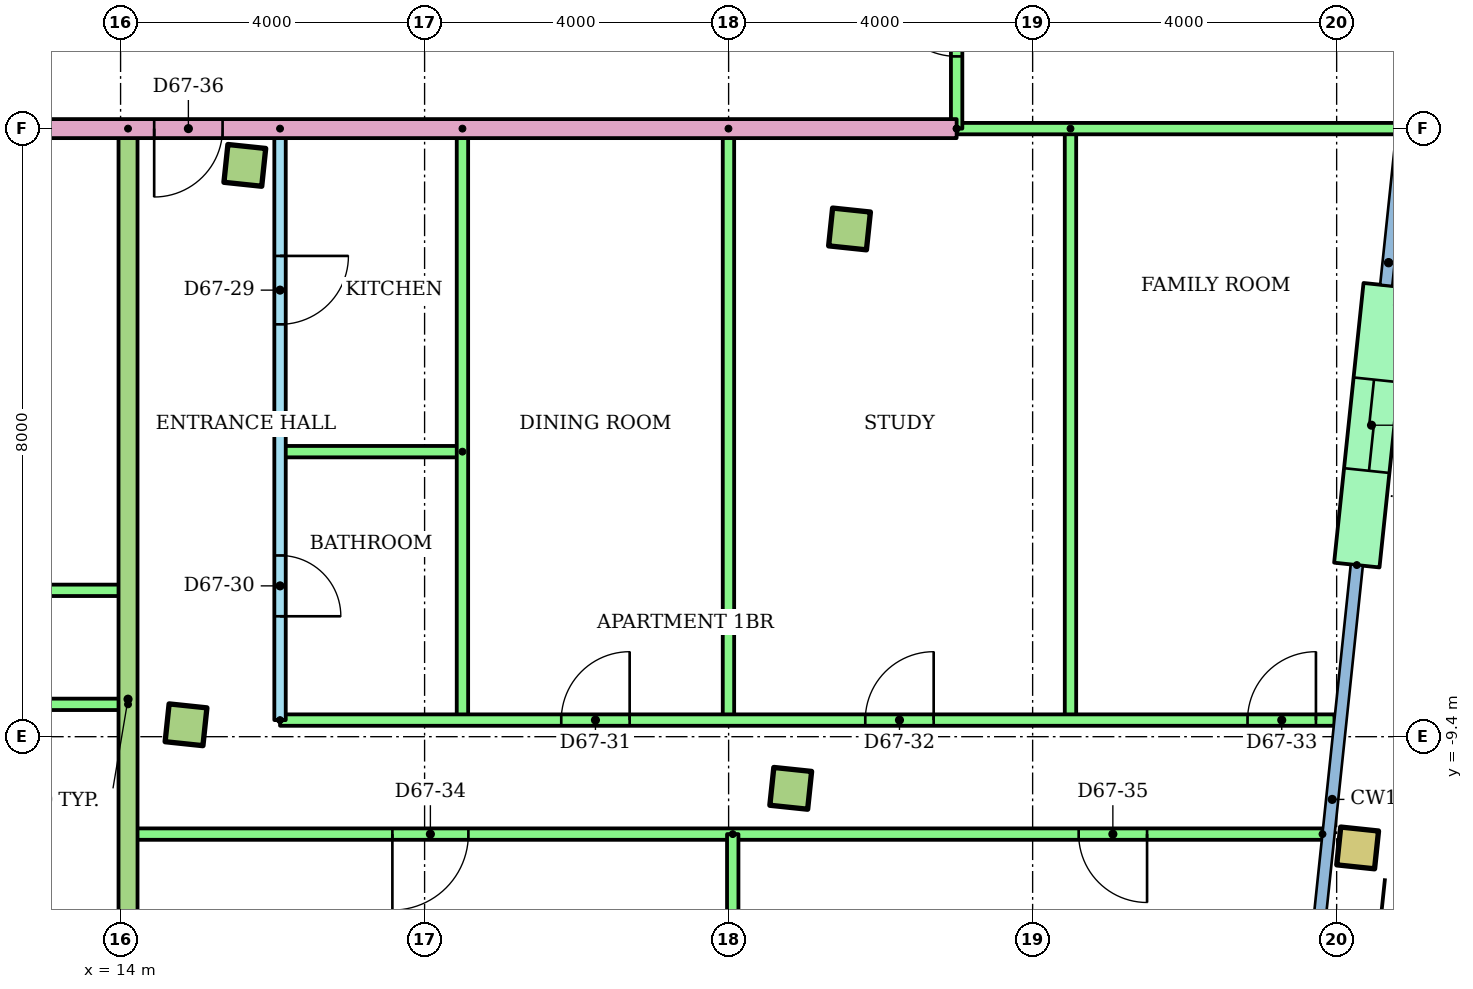
"""IFC4 building model, lengths in metres.
Left out: names, types, materials, properties, quantities, classifications, styles, units other than length and angle.
Written with IfcOpenShell. Run it as: python <this file> out.ifc"""

import sys

from ifc_helpers import new_model, si_unit, direction, frame, frame_2d, origin, origin_2d, place, context, subcontext, project, spatial, rectangle, hollow_rectangle, extrude, element, fill, save


model = new_model("IFC4")
c1 = context("Model", 3, precision=1e-05, world=origin(), true_north=direction((0.0, 1.0)))
c2 = subcontext(c1, "Body", "Model", "MODEL_VIEW")
j1 = project(units=[si_unit("LENGTHUNIT", "METRE"), si_unit("PLANEANGLEUNIT", "RADIAN")], contexts=[c1])
p1 = place(None, origin())
s1 = spatial("IfcSite", under=j1, at=p1, CompositionType="ELEMENT")
p2 = place(p1, origin())
s2 = spatial("IfcBuilding", under=s1, at=p2, CompositionType="ELEMENT")
p3 = place(p2, frame((0.0, 0.0, 259.5)))
s3 = spatial("IfcBuildingStorey", under=s2, at=p3, CompositionType="ELEMENT", Elevation=259.5)
for number, where, z_axis, x_axis in (
    (1, (14.861, -9.243, 0.0), (0.0, 0.0, 1.0), (0.995, -0.105, 0.0)),
    (2, (22.817, -10.08, 0.0), (0.0, 0.0, 1.0), (0.995, -0.105, 0.0)),
):
    element("IfcColumn", number, at=place(p3, frame(where, z_axis=z_axis, x_axis=x_axis)), inside=s3, PredefinedType="COLUMN", context=c2, shape_type="SweptSolid", body=[
        extrude(rectangle(XDim=0.5, YDim=0.5, at=origin_2d()), origin(), (0.0, 0.0, 1.0), 3.2),
    ])
p4 = place(p3, frame((30.276, -10.864, 0.0), z_axis=(0.0, 0.0, 1.0), x_axis=(0.994521895368, -0.104528463268, 0.0)))
e3 = element("IfcColumn", 3, at=p4, inside=s3, PredefinedType="COLUMN", context=c2, shape_type="SweptSolid", body=[
    extrude(hollow_rectangle(XDim=0.5, YDim=0.5, WallThickness=0.025, at=origin_2d()), origin(), (0.0, 0.0, 1.0), 3.2),
])
for number, where, z_axis, x_axis in (
    (4, (15.635, -1.884, 0.0), (0.0, 0.0, 1.0), (0.995, -0.105, 0.0)),
    (5, (23.591, -2.72, 0.0), (0.0, 0.0, 1.0), (0.995, -0.105, 0.0)),
):
    element("IfcColumn", number, at=place(p3, frame(where, z_axis=z_axis, x_axis=x_axis)), inside=s3, PredefinedType="COLUMN", context=c2, shape_type="SweptSolid", body=[
        extrude(rectangle(XDim=0.5, YDim=0.5, at=origin_2d()), origin(), (0.0, 0.0, 1.0), 3.2),
    ])
p5 = place(p3, frame((30.265, -7.142, 0.0), z_axis=(0.0, 0.0, 1.0), x_axis=(0.104513052986, 0.994523514933, 0.0)))
e6 = element("IfcWall", 6, at=p5, inside=s3, PredefinedType="STANDARD", context=c2, shape_type="SweptSolid", body=[
    extrude(rectangle(XDim=3.7, YDim=0.6, at=frame_2d((1.85, 0.0))), origin(), (0.0, 0.0, 1.0), 2.92),
])
p6 = place(p5, frame((1.25, 0.0, 0.0)))
e7 = element("IfcOpeningElement", 7, at=p6, cuts=e6, PredefinedType="OPENING", context=c2, shape_type="SweptSolid", body=[
    extrude(rectangle(XDim=1.2, YDim=2.1, at=frame_2d((0.6, 1.05))), frame((0.0, 0.31, 0.0), z_axis=(0.0, -1.0, 0.0), x_axis=(1.0, 0.0, 0.0)), (0.0, 0.0, 1.0), 0.62),
])
p7 = place(p3, frame((-7.77, -7.475, 0.0)))
e8 = element("IfcWall", 8, at=p7, inside=s3, PredefinedType="PARTITIONING", context=c2, shape_type="SweptSolid", body=[
    extrude(rectangle(XDim=21.868, YDim=0.15, at=frame_2d((10.934, 0.0))), origin(), (0.0, 0.0, 1.0), 2.4),
])
p8 = place(p7, frame((5.414, 0.0, 0.0)))
e9 = element("IfcOpeningElement", 9, at=p8, cuts=e8, PredefinedType="OPENING", context=c2, shape_type="SweptSolid", body=[
    extrude(rectangle(XDim=0.9, YDim=2.1, at=frame_2d((0.45, 1.05))), frame((0.0, 0.085, 0.0), z_axis=(0.0, -1.0, 0.0), x_axis=(1.0, 0.0, 0.0)), (0.0, 0.0, 1.0), 0.17),
])
p9 = place(p7, frame((13.37, 0.0, 0.0)))
e10 = element("IfcOpeningElement", 10, at=p9, cuts=e8, PredefinedType="OPENING", context=c2, shape_type="SweptSolid", body=[
    extrude(rectangle(XDim=0.9, YDim=2.1, at=frame_2d((0.45, 1.05))), frame((0.0, 0.085, 0.0), z_axis=(0.0, -1.0, 0.0), x_axis=(1.0, 0.0, 0.0)), (0.0, 0.0, 1.0), 0.17),
])
p10 = place(p7, frame((19.059, 0.0, 0.0)))
e11 = element("IfcOpeningElement", 11, at=p10, cuts=e8, PredefinedType="OPENING", context=c2, shape_type="SweptSolid", body=[
    extrude(rectangle(XDim=0.9, YDim=2.1, at=frame_2d((0.45, 1.05))), frame((0.0, 0.085, 0.0), z_axis=(0.0, -1.0, 0.0), x_axis=(1.0, 0.0, 0.0)), (0.0, 0.0, 1.0), 0.17),
])
p11 = place(p3, frame((14.098, -8.975, 0.0), z_axis=(0.0, 0.0, 1.0), x_axis=(-1.0, 0.0, 0.0)))
e12 = element("IfcWall", 12, at=p11, inside=s3, PredefinedType="PARTITIONING", context=c2, shape_type="SweptSolid", body=[
    extrude(rectangle(XDim=23.868, YDim=0.15, at=frame_2d((11.934, 0.0))), origin(), (0.0, 0.0, 1.0), 2.4),
])
p12 = place(p11, frame((21.429, 0.0, 0.0)))
e13 = element("IfcOpeningElement", 13, at=p12, cuts=e12, PredefinedType="OPENING", context=c2, shape_type="SweptSolid", body=[
    extrude(rectangle(XDim=0.9, YDim=2.1, at=frame_2d((0.45, 1.05))), frame((0.0, 0.085, 0.0), z_axis=(0.0, -1.0, 0.0), x_axis=(1.0, 0.0, 0.0)), (0.0, 0.0, 1.0), 0.17),
])
p13 = place(p11, frame((17.451, 0.0, 0.0)))
e14 = element("IfcOpeningElement", 14, at=p13, cuts=e12, PredefinedType="OPENING", context=c2, shape_type="SweptSolid", body=[
    extrude(rectangle(XDim=0.9, YDim=2.1, at=frame_2d((0.45, 1.05))), frame((0.0, 0.085, 0.0), z_axis=(0.0, -1.0, 0.0), x_axis=(1.0, 0.0, 0.0)), (0.0, 0.0, 1.0), 0.17),
])
p14 = place(p11, frame((12.252, 0.0, 0.0)))
e15 = element("IfcOpeningElement", 15, at=p14, cuts=e12, PredefinedType="OPENING", context=c2, shape_type="SweptSolid", body=[
    extrude(rectangle(XDim=0.9, YDim=2.1, at=frame_2d((0.45, 1.05))), frame((0.0, 0.085, 0.0), z_axis=(0.0, -1.0, 0.0), x_axis=(1.0, 0.0, 0.0)), (0.0, 0.0, 1.0), 0.17),
])
p15 = place(p11, frame((9.495, 0.0, 0.0)))
e16 = element("IfcOpeningElement", 16, at=p15, cuts=e12, PredefinedType="OPENING", context=c2, shape_type="SweptSolid", body=[
    extrude(rectangle(XDim=0.9, YDim=2.1, at=frame_2d((0.45, 1.05))), frame((0.0, 0.085, 0.0), z_axis=(0.0, -1.0, 0.0), x_axis=(1.0, 0.0, 0.0)), (0.0, 0.0, 1.0), 0.17),
])
p16 = place(p11, frame((3.478, 0.0, 0.0)))
e17 = element("IfcOpeningElement", 17, at=p16, cuts=e12, PredefinedType="OPENING", context=c2, shape_type="SweptSolid", body=[
    extrude(rectangle(XDim=1.0, YDim=2.1, at=frame_2d((0.5, 1.05))), frame((0.0, 0.085, 0.0), z_axis=(0.0, -1.0, 0.0), x_axis=(1.0, 0.0, 0.0)), (0.0, 0.0, 1.0), 0.17),
])
p17 = place(p3, frame((16.098, -1.4, 0.0), z_axis=(0.0, 0.0, 1.0), x_axis=(0.0, -1.0, 0.0)))
e18 = element("IfcWall", 18, at=p17, inside=s3, PredefinedType="PARTITIONING", context=c2, shape_type="SweptSolid", body=[
    extrude(rectangle(XDim=7.782, YDim=0.15, at=frame_2d((3.891, 0.0))), origin(), (0.0, 0.0, 1.0), 2.4),
])
p18 = place(p17, frame((1.675, 0.0, 0.0)))
e19 = element("IfcOpeningElement", 19, at=p18, cuts=e18, PredefinedType="OPENING", context=c2, shape_type="SweptSolid", body=[
    extrude(rectangle(XDim=0.9, YDim=2.1, at=frame_2d((0.45, 1.05))), frame((0.0, 0.085, 0.0), z_axis=(0.0, -1.0, 0.0), x_axis=(1.0, 0.0, 0.0)), (0.0, 0.0, 1.0), 0.17),
])
p19 = place(p17, frame((5.616, 0.0, 0.0)))
e20 = element("IfcOpeningElement", 20, at=p19, cuts=e18, PredefinedType="OPENING", context=c2, shape_type="SweptSolid", body=[
    extrude(rectangle(XDim=0.8, YDim=2.1, at=frame_2d((0.4, 1.05))), frame((0.0, 0.085, 0.0), z_axis=(0.0, -1.0, 0.0), x_axis=(1.0, 0.0, 0.0)), (0.0, 0.0, 1.0), 0.17),
])
p20 = place(p3, frame((18.498, -5.65, 0.0), z_axis=(0.0, 0.0, 1.0), x_axis=(-1.0, 0.0, 0.0)))
e21 = element("IfcWall", 21, at=p20, inside=s3, PredefinedType="PARTITIONING", context=c2, shape_type="SweptSolid", body=[
    extrude(rectangle(XDim=2.4, YDim=0.15, at=frame_2d((1.2, 0.0))), origin(), (0.0, 0.0, 1.0), 2.4),
])
for number, where, z_axis, x_axis in (
    (22, (18.498, -1.4, 0.0), (0.0, 0.0, 1.0), (0.0, -1.0, 0.0)),
    (23, (21.998, -1.4, 0.0), (0.0, 0.0, 1.0), (0.0, -1.0, 0.0)),
    (24, (26.498, -1.4, 0.0), (0.0, 0.0, 1.0), (0.0, -1.0, 0.0)),
):
    element("IfcWall", number, at=place(p3, frame(where, z_axis=z_axis, x_axis=x_axis)), inside=s3, PredefinedType="PARTITIONING", context=c2, shape_type="SweptSolid", body=[
        extrude(rectangle(XDim=7.782, YDim=0.15, at=frame_2d((3.891, 0.0))), origin(), (0.0, 0.0, 1.0), 2.4),
    ])
p21 = place(p3, frame((16.098, -9.182, 0.0)))
e25 = element("IfcWall", 25, at=p21, inside=s3, PredefinedType="PARTITIONING", context=c2, shape_type="SweptSolid", body=[
    extrude(rectangle(XDim=13.873, YDim=0.15, at=frame_2d((6.937, 0.0))), origin(), (0.0, 0.0, 1.0), 2.4),
])
p22 = place(p21, frame((3.7, 0.0, 0.0)))
e26 = element("IfcOpeningElement", 26, at=p22, cuts=e25, PredefinedType="OPENING", context=c2, shape_type="SweptSolid", body=[
    extrude(rectangle(XDim=0.9, YDim=2.1, at=frame_2d((0.45, 1.05))), frame((0.0, 0.085, 0.0), z_axis=(0.0, -1.0, 0.0), x_axis=(1.0, 0.0, 0.0)), (0.0, 0.0, 1.0), 0.17),
])
p23 = place(p21, frame((7.7, 0.0, 0.0)))
e27 = element("IfcOpeningElement", 27, at=p23, cuts=e25, PredefinedType="OPENING", context=c2, shape_type="SweptSolid", body=[
    extrude(rectangle(XDim=0.9, YDim=2.1, at=frame_2d((0.45, 1.05))), frame((0.0, 0.085, 0.0), z_axis=(0.0, -1.0, 0.0), x_axis=(1.0, 0.0, 0.0)), (0.0, 0.0, 1.0), 0.17),
])
p24 = place(p21, frame((12.729, 0.0, 0.0)))
e28 = element("IfcOpeningElement", 28, at=p24, cuts=e25, PredefinedType="OPENING", context=c2, shape_type="SweptSolid", body=[
    extrude(rectangle(XDim=0.9, YDim=2.1, at=frame_2d((0.45, 1.05))), frame((0.0, 0.085, 0.0), z_axis=(0.0, -1.0, 0.0), x_axis=(1.0, 0.0, 0.0)), (0.0, 0.0, 1.0), 0.17),
])
p25 = place(p3, frame((29.814, -10.682, 0.0), z_axis=(0.0, 0.0, 1.0), x_axis=(-1.0, 0.0, 0.0)))
e29 = element("IfcWall", 29, at=p25, inside=s3, PredefinedType="PARTITIONING", context=c2, shape_type="SweptSolid", body=[
    extrude(rectangle(XDim=15.716, YDim=0.15, at=frame_2d((7.858, 0.0))), origin(), (0.0, 0.0, 1.0), 2.4),
])
p26 = place(p25, frame((11.238, 0.0, 0.0)))
e30 = element("IfcOpeningElement", 30, at=p26, cuts=e29, PredefinedType="OPENING", context=c2, shape_type="SweptSolid", body=[
    extrude(rectangle(XDim=1.0, YDim=2.1, at=frame_2d((0.5, 1.05))), frame((0.0, 0.085, 0.0), z_axis=(0.0, -1.0, 0.0), x_axis=(1.0, 0.0, 0.0)), (0.0, 0.0, 1.0), 0.17),
])
p27 = place(p25, frame((2.308, 0.0, 0.0)))
e31 = element("IfcOpeningElement", 31, at=p27, cuts=e29, PredefinedType="OPENING", context=c2, shape_type="SweptSolid", body=[
    extrude(rectangle(XDim=0.9, YDim=2.1, at=frame_2d((0.45, 1.05))), frame((0.0, 0.085, 0.0), z_axis=(0.0, -1.0, 0.0), x_axis=(1.0, 0.0, 0.0)), (0.0, 0.0, 1.0), 0.17),
])
p28 = place(p3, frame((22.054, -10.682, 0.0), z_axis=(0.0, 0.0, 1.0), x_axis=(0.0, -1.0, 0.0)))
e32 = element("IfcWall", 32, at=p28, inside=s3, PredefinedType="PARTITIONING", context=c2, shape_type="SweptSolid", body=[
    extrude(rectangle(XDim=6.567, YDim=0.15, at=frame_2d((3.284, 0.0))), origin(), (0.0, 0.0, 1.0), 2.4),
])
p29 = place(p3, frame((14.098, -1.4, 0.0), z_axis=(0.0, 0.0, 1.0), x_axis=(0.0, -1.0, 0.0)))
e33 = element("IfcWall", 33, at=p29, inside=s3, PredefinedType="PARTITIONING", context=c2, shape_type="SweptSolid", body=[
    extrude(rectangle(XDim=15.013, YDim=0.25, at=frame_2d((7.506, 0.0))), origin(), (0.0, 0.0, 1.0), 2.4),
])
p30 = place(p3, frame((25.0, -1.4, 0.0), z_axis=(0.0, 0.0, 1.0), x_axis=(-1.0, 0.0, 0.0)))
e34 = element("IfcWall", 34, at=p30, inside=s3, PredefinedType="PARTITIONING", context=c2, shape_type="SweptSolid", body=[
    extrude(rectangle(XDim=15.0, YDim=0.25, at=frame_2d((7.5, 0.0))), origin(), (0.0, 0.0, 1.0), 2.4),
])
p31 = place(p30, frame((9.658, 0.0, 0.0)))
e35 = element("IfcOpeningElement", 35, at=p31, cuts=e34, PredefinedType="OPENING", context=c2, shape_type="SweptSolid", body=[
    extrude(rectangle(XDim=0.9, YDim=2.1, at=frame_2d((0.45, 1.05))), frame((0.0, 0.135, 0.0), z_axis=(0.0, -1.0, 0.0), x_axis=(1.0, 0.0, 0.0)), (0.0, 0.0, 1.0), 0.27),
])
p32 = place(p3, frame((30.798, -1.4, 0.0), z_axis=(0.0, 0.0, 1.0), x_axis=(-1.0, 0.0, 0.0)))
e36 = element("IfcWall", 36, at=p32, inside=s3, PredefinedType="PARTITIONING", context=c2, shape_type="SweptSolid", body=[
    extrude(rectangle(XDim=5.798, YDim=0.15, at=frame_2d((2.899, 0.0))), origin(), (0.0, 0.0, 1.0), 2.4),
])
p33 = place(p3, frame((25.0, -1.4, 0.0), z_axis=(0.0, 0.0, 1.0), x_axis=(0.0, 1.0, 0.0)))
e37 = element("IfcWall", 37, at=p33, inside=s3, PredefinedType="PARTITIONING", context=c2, shape_type="SweptSolid", body=[
    extrude(rectangle(XDim=2.8, YDim=0.15, at=frame_2d((1.4, 0.0))), origin(), (0.0, 0.0, 1.0), 2.4),
])
p34 = place(p33, frame((0.95, 0.0, 0.0)))
e38 = element("IfcOpeningElement", 38, at=p34, cuts=e37, PredefinedType="OPENING", context=c2, shape_type="SweptSolid", body=[
    extrude(rectangle(XDim=0.9, YDim=2.1, at=frame_2d((0.45, 1.05))), frame((0.0, 0.085, 0.0), z_axis=(0.0, -1.0, 0.0), x_axis=(1.0, 0.0, 0.0)), (0.0, 0.0, 1.0), 0.17),
])
p35 = place(p18, origin())
e39 = element("IfcDoor", 39, at=p35, inside=s3, OperationType="SINGLE_SWING_LEFT", PredefinedType="DOOR", context=c2, shape_type="SweptSolid", body=[
    extrude(rectangle(XDim=0.9, YDim=2.1, at=frame_2d((0.45, 1.05))), frame((0.0, 0.025, 0.0), z_axis=(0.0, -1.0, 0.0), x_axis=(1.0, 0.0, 0.0)), (0.0, 0.0, 1.0), 0.05),
])
fill(e19, e39)
p36 = place(p19, origin())
e40 = element("IfcDoor", 40, at=p36, inside=s3, OperationType="SINGLE_SWING_RIGHT", PredefinedType="DOOR", context=c2, shape_type="SweptSolid", body=[
    extrude(rectangle(XDim=0.8, YDim=2.1, at=frame_2d((0.4, 1.05))), frame((0.0, 0.025, 0.0), z_axis=(0.0, -1.0, 0.0), x_axis=(1.0, 0.0, 0.0)), (0.0, 0.0, 1.0), 0.05),
])
fill(e20, e40)
p37 = place(p22, origin())
e41 = element("IfcDoor", 41, at=p37, inside=s3, OperationType="SINGLE_SWING_RIGHT", PredefinedType="DOOR", context=c2, shape_type="SweptSolid", body=[
    extrude(rectangle(XDim=0.9, YDim=2.1, at=frame_2d((0.45, 1.05))), frame((0.0, 0.025, 0.0), z_axis=(0.0, -1.0, 0.0), x_axis=(1.0, 0.0, 0.0)), (0.0, 0.0, 1.0), 0.05),
])
fill(e26, e41)
p38 = place(p23, origin())
e42 = element("IfcDoor", 42, at=p38, inside=s3, OperationType="SINGLE_SWING_RIGHT", PredefinedType="DOOR", context=c2, shape_type="SweptSolid", body=[
    extrude(rectangle(XDim=0.9, YDim=2.1, at=frame_2d((0.45, 1.05))), frame((0.0, 0.025, 0.0), z_axis=(0.0, -1.0, 0.0), x_axis=(1.0, 0.0, 0.0)), (0.0, 0.0, 1.0), 0.05),
])
fill(e27, e42)
p39 = place(p24, origin())
e43 = element("IfcDoor", 43, at=p39, inside=s3, OperationType="SINGLE_SWING_RIGHT", PredefinedType="DOOR", context=c2, shape_type="SweptSolid", body=[
    extrude(rectangle(XDim=0.9, YDim=2.1, at=frame_2d((0.45, 1.05))), frame((0.0, 0.025, 0.0), z_axis=(0.0, -1.0, 0.0), x_axis=(1.0, 0.0, 0.0)), (0.0, 0.0, 1.0), 0.05),
])
fill(e28, e43)
p40 = place(p26, origin())
e44 = element("IfcDoor", 44, at=p40, inside=s3, OperationType="SINGLE_SWING_RIGHT", PredefinedType="DOOR", context=c2, shape_type="SweptSolid", body=[
    extrude(rectangle(XDim=1.0, YDim=2.1, at=frame_2d((0.5, 1.05))), frame((0.0, 0.025, 0.0), z_axis=(0.0, -1.0, 0.0), x_axis=(1.0, 0.0, 0.0)), (0.0, 0.0, 1.0), 0.05),
])
fill(e30, e44)
p41 = place(p27, origin())
e45 = element("IfcDoor", 45, at=p41, inside=s3, OperationType="SINGLE_SWING_LEFT", PredefinedType="DOOR", context=c2, shape_type="SweptSolid", body=[
    extrude(rectangle(XDim=0.9, YDim=2.1, at=frame_2d((0.45, 1.05))), frame((0.0, 0.025, 0.0), z_axis=(0.0, -1.0, 0.0), x_axis=(1.0, 0.0, 0.0)), (0.0, 0.0, 1.0), 0.05),
])
fill(e31, e45)
p42 = place(p31, origin())
e46 = element("IfcDoor", 46, at=p42, inside=s3, OperationType="SINGLE_SWING_RIGHT", PredefinedType="DOOR", context=c2, shape_type="SweptSolid", body=[
    extrude(rectangle(XDim=0.9, YDim=2.1, at=frame_2d((0.45, 1.05))), frame((0.0, 0.025, 0.0), z_axis=(0.0, -1.0, 0.0), x_axis=(1.0, 0.0, 0.0)), (0.0, 0.0, 1.0), 0.05),
])
fill(e35, e46)
p43 = place(p34, origin())
e47 = element("IfcDoor", 47, at=p43, inside=s3, OperationType="SINGLE_SWING_RIGHT", PredefinedType="DOOR", context=c2, shape_type="SweptSolid", body=[
    extrude(rectangle(XDim=0.9, YDim=2.1, at=frame_2d((0.45, 1.05))), frame((0.0, 0.025, 0.0), z_axis=(0.0, -1.0, 0.0), x_axis=(1.0, 0.0, 0.0)), (0.0, 0.0, 1.0), 0.05),
])
fill(e38, e47)
p44 = place(p6, origin())
e48 = element("IfcDoor", 48, at=p44, inside=s3, OperationType="SLIDING_TO_LEFT", PredefinedType="DOOR", context=c2, shape_type="SweptSolid", body=[
    extrude(rectangle(XDim=1.2, YDim=2.1, at=frame_2d((0.6, 1.05))), frame((0.0, 0.025, 0.0), z_axis=(0.0, -1.0, 0.0), x_axis=(1.0, 0.0, 0.0)), (0.0, 0.0, 1.0), 0.05),
])
fill(e7, e48)
save(model, sys.argv[1])
